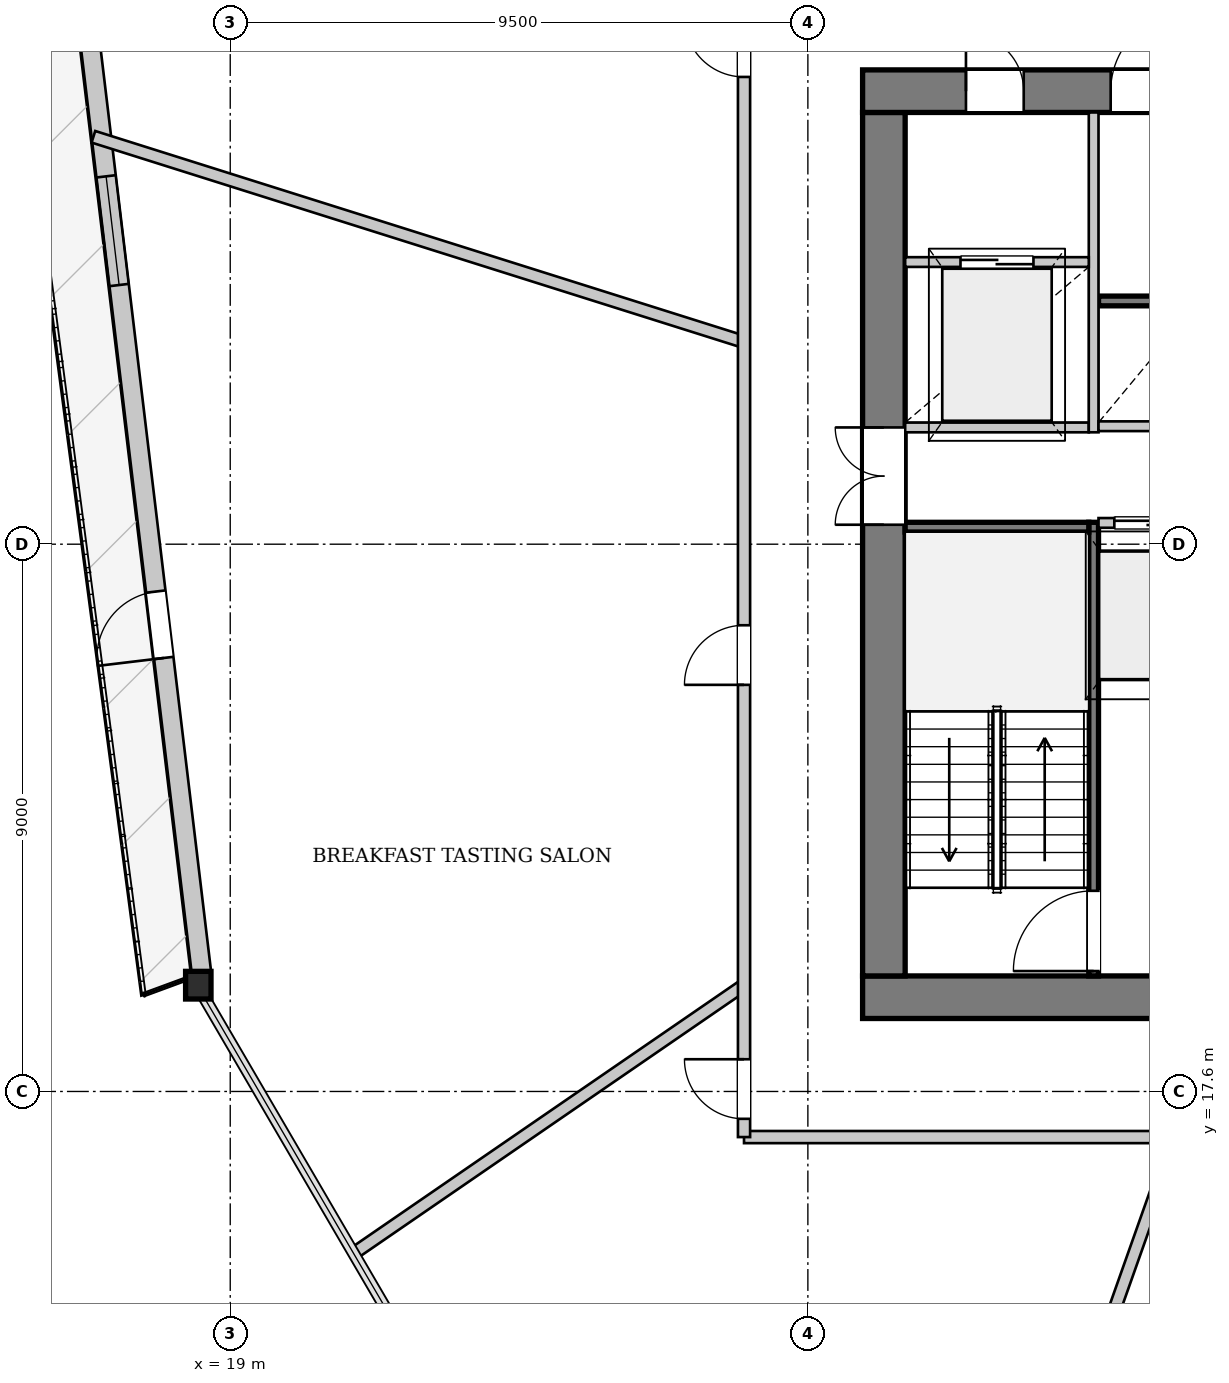
"""IFC4 building model, lengths in metres.
Left out: names, types, materials, properties, quantities, classifications, styles, units other than length and angle.
Written with IfcOpenShell. Run it as: python <this file> out.ifc"""

import sys

from ifc_helpers import new_model, si_unit, direction, frame, frame_2d, origin, origin_2d, place, context, subcontext, project, spatial, rectangle, i_section, extrude, source, transform, mapped, element, fill, save


model = new_model("IFC4")
c1 = context("Model", 3, precision=1e-05, world=origin(), true_north=direction((0.0, 1.0)))
c2 = subcontext(c1, "Body", "Model", "MODEL_VIEW")
j1 = project(units=[si_unit("LENGTHUNIT", "METRE"), si_unit("PLANEANGLEUNIT", "RADIAN")], contexts=[c1])
p1 = place(None, origin())
s1 = spatial("IfcSite", under=j1, at=p1, CompositionType="ELEMENT")
p2 = place(p1, origin())
s2 = spatial("IfcBuilding", under=s1, at=p2, CompositionType="ELEMENT")
p3 = place(p2, frame((0.0, 0.0, 116.35)))
s3 = spatial("IfcBuildingStorey", under=s2, at=p3, CompositionType="ELEMENT", Elevation=116.35)
m1 = source(origin(), c2, "Body", "SweptSolid", [
    extrude(i_section(OverallWidth=0.418, OverallDepth=0.455, WebThickness=0.038, FlangeThickness=0.059, at=origin_2d()), origin(), (0.0, 0.0, 1.0), 3.402),
])
p4 = place(p3, frame((18.374, 19.485, 0.0), z_axis=(0.059560945923, -0.080730197787, 0.994954837611), x_axis=(0.804696120474, 0.593686915549, 0.0)))
e1 = element("IfcColumn", 1, at=p4, inside=s3, PredefinedType="COLUMN", context=c2, shape_type="MappedRepresentation", body=[
    mapped(m1, transform((0.0, 0.0, 0.0), x_axis=(1.0, 0.0, 0.0), y_axis=(0.0, 1.0, 0.0), z_axis=(0.0, 0.0, 1.0), scale=1.0)),
])
p5 = place(p3, frame((52.121, 16.301, 0.0), z_axis=(0.0, 0.0, 1.0), x_axis=(-0.821520503946, -0.570178973303, 0.0)))
e2 = element("IfcWall", 2, at=p5, inside=s3, PredefinedType="SOLIDWALL", context=c2, shape_type="SweptSolid", body=[
    extrude(rectangle(XDim=23.887, YDim=0.32, at=frame_2d((11.944, 0.0))), origin(), (0.0, 0.0, 1.0), 2.692),
])
p6 = place(p5, frame((7.094, 0.0, 0.0)))
e3 = element("IfcOpeningElement", 3, at=p6, cuts=e2, PredefinedType="OPENING", context=c2, shape_type="SweptSolid", body=[
    extrude(rectangle(XDim=1.1, YDim=2.3, at=frame_2d((0.55, 1.15))), frame((0.0, 0.17, 0.0), z_axis=(0.0, -1.0, 0.0), x_axis=(1.0, 0.0, 0.0)), (0.0, 0.0, 1.0), 0.34),
])
p7 = place(p5, frame((16.777, 0.0, 0.372)))
e4 = element("IfcOpeningElement", 4, at=p7, cuts=e2, PredefinedType="OPENING", context=c2, shape_type="SweptSolid", body=[
    extrude(rectangle(XDim=1.8, YDim=2.2, at=frame_2d((0.9, 1.1))), frame((0.0, 0.17, 0.0), z_axis=(0.0, -1.0, 0.0), x_axis=(1.0, 0.0, 0.0)), (0.0, 0.0, 1.0), 0.34),
])
p8 = place(p3, frame((18.532, 19.504, 0.0), z_axis=(0.0, 0.0, 1.0), x_axis=(-0.118889186276, 0.992907529122, 0.0)))
e5 = element("IfcWall", 5, at=p8, inside=s3, PredefinedType="SOLIDWALL", context=c2, shape_type="SweptSolid", body=[
    extrude(rectangle(XDim=18.161, YDim=0.32, at=frame_2d((9.081, 0.0))), origin(), (0.0, 0.0, 1.0), 2.692),
])
p9 = place(p8, frame((5.262, 0.0, 0.0)))
e6 = element("IfcOpeningElement", 6, at=p9, cuts=e5, PredefinedType="OPENING", context=c2, shape_type="SweptSolid", body=[
    extrude(rectangle(XDim=1.1, YDim=2.3, at=frame_2d((0.55, 1.15))), frame((0.0, 0.17, 0.0), z_axis=(0.0, -1.0, 0.0), x_axis=(1.0, 0.0, 0.0)), (0.0, 0.0, 1.0), 0.34),
])
p10 = place(p8, frame((11.439, 0.0, 0.372)))
e7 = element("IfcOpeningElement", 7, at=p10, cuts=e5, PredefinedType="OPENING", context=c2, shape_type="SweptSolid", body=[
    extrude(rectangle(XDim=1.8, YDim=2.2, at=frame_2d((0.9, 1.1))), frame((0.0, 0.17, 0.0), z_axis=(0.0, -1.0, 0.0), x_axis=(1.0, 0.0, 0.0)), (0.0, 0.0, 1.0), 0.34),
])
p11 = place(p3, frame((46.6, 19.15, 0.0), z_axis=(0.0, 0.0, 1.0), x_axis=(-1.0, 0.0, 0.0)))
e8 = element("IfcWall", 8, at=p11, inside=s3, PredefinedType="SHEAR", context=c2, shape_type="SweptSolid", body=[
    extrude(rectangle(XDim=17.2, YDim=0.7, at=frame_2d((8.6, 0.0))), origin(), (0.0, 0.0, 1.0), 3.3),
])
p12 = place(p11, frame((4.8, 0.0, 0.0)))
e9 = element("IfcOpeningElement", 9, at=p12, cuts=e8, PredefinedType="OPENING", context=c2, shape_type="SweptSolid", body=[
    extrude(rectangle(XDim=1.12, YDim=2.25, at=frame_2d((0.56, 1.125))), frame((0.0, 0.36, 0.0), z_axis=(0.0, -1.0, 0.0), x_axis=(1.0, 0.0, 0.0)), (0.0, 0.0, 1.0), 0.72),
])
p13 = place(p11, frame((11.3, 0.0, 0.0)))
e10 = element("IfcOpeningElement", 10, at=p13, cuts=e8, PredefinedType="OPENING", context=c2, shape_type="SweptSolid", body=[
    extrude(rectangle(XDim=1.12, YDim=2.25, at=frame_2d((0.56, 1.125))), frame((0.0, 0.36, 0.0), z_axis=(0.0, -1.0, 0.0), x_axis=(1.0, 0.0, 0.0)), (0.0, 0.0, 1.0), 0.72),
])
p14 = place(p3, frame((29.75, 19.5, 0.0), z_axis=(0.0, 0.0, 1.0), x_axis=(0.0, 1.0, 0.0)))
e11 = element("IfcWall", 11, at=p14, inside=s3, PredefinedType="SHEAR", context=c2, shape_type="SweptSolid", body=[
    extrude(rectangle(XDim=14.2, YDim=0.7, at=frame_2d((7.1, 0.0))), origin(), (0.0, 0.0, 1.0), 3.3),
])
p15 = place(p14, frame((7.42, 0.0, 0.0)))
e12 = element("IfcOpeningElement", 12, at=p15, cuts=e11, PredefinedType="OPENING", context=c2, shape_type="SweptSolid", body=[
    extrude(rectangle(XDim=1.6, YDim=2.2, at=frame_2d((0.8, 1.1))), frame((0.0, 0.36, 0.0), z_axis=(0.0, -1.0, 0.0), x_axis=(1.0, 0.0, 0.0)), (0.0, 0.0, 1.0), 0.72),
])
p16 = place(p3, frame((29.4, 34.05, 0.0), z_axis=(0.0, 0.0, 1.0), x_axis=(1.0, 0.0, 0.0)))
e13 = element("IfcWall", 13, at=p16, inside=s3, PredefinedType="SHEAR", context=c2, shape_type="SweptSolid", body=[
    extrude(rectangle(XDim=17.2, YDim=0.7, at=frame_2d((8.6, 0.0))), origin(), (0.0, 0.0, 1.0), 3.3),
])
p17 = place(p16, frame((1.7, 0.0, 0.0)))
e14 = element("IfcOpeningElement", 14, at=p17, cuts=e13, PredefinedType="OPENING", context=c2, shape_type="SweptSolid", body=[
    extrude(rectangle(XDim=0.95, YDim=2.1, at=frame_2d((0.475, 1.05))), frame((0.0, 0.36, 0.0), z_axis=(0.0, -1.0, 0.0), x_axis=(1.0, 0.0, 0.0)), (0.0, 0.0, 1.0), 0.72),
])
p18 = place(p16, frame((4.08, 0.0, 0.0)))
e15 = element("IfcOpeningElement", 15, at=p18, cuts=e13, PredefinedType="OPENING", context=c2, shape_type="SweptSolid", body=[
    extrude(rectangle(XDim=1.32, YDim=2.2, at=frame_2d((0.66, 1.1))), frame((0.0, 0.36, 0.0), z_axis=(0.0, -1.0, 0.0), x_axis=(1.0, 0.0, 0.0)), (0.0, 0.0, 1.0), 0.72),
])
p19 = place(p16, frame((15.15, 0.0, 0.0)))
e16 = element("IfcOpeningElement", 16, at=p19, cuts=e13, PredefinedType="OPENING", context=c2, shape_type="SweptSolid", body=[
    extrude(rectangle(XDim=0.95, YDim=2.1, at=frame_2d((0.475, 1.05))), frame((0.0, 0.36, 0.0), z_axis=(0.0, -1.0, 0.0), x_axis=(1.0, 0.0, 0.0)), (0.0, 0.0, 1.0), 0.72),
])
p20 = place(p3, frame((33.2, 19.5, 0.0), z_axis=(0.0, 0.0, 1.0), x_axis=(0.0, 1.0, 0.0)))
e17 = element("IfcWall", 17, at=p20, inside=s3, PredefinedType="PARTITIONING", context=c2, shape_type="SweptSolid", body=[
    extrude(rectangle(XDim=7.46, YDim=0.16, at=frame_2d((3.73, 0.0))), origin(), (0.0, 0.0, 1.0), 3.3),
])
p21 = place(p20, frame((0.08, 0.0, 0.0)))
e18 = element("IfcOpeningElement", 18, at=p21, cuts=e17, PredefinedType="OPENING", context=c2, shape_type="SweptSolid", body=[
    extrude(rectangle(XDim=1.32, YDim=2.2, at=frame_2d((0.66, 1.1))), frame((0.0, 0.09, 0.0), z_axis=(0.0, -1.0, 0.0), x_axis=(1.0, 0.0, 0.0)), (0.0, 0.0, 1.0), 0.18),
])
p22 = place(p3, frame((30.1, 26.88, 0.0), z_axis=(0.0, 0.0, 1.0), x_axis=(1.0, 0.0, 0.0)))
e19 = element("IfcWall", 19, at=p22, inside=s3, PredefinedType="PARTITIONING", context=c2, shape_type="SweptSolid", body=[
    extrude(rectangle(XDim=3.02, YDim=0.16, at=frame_2d((1.51, 0.0))), origin(), (0.0, 0.0, 1.0), 3.3),
])
p23 = place(p3, frame((33.28, 30.6, 0.0), z_axis=(0.0, 0.0, 1.0), x_axis=(1.0, 0.0, 0.0)))
e20 = element("IfcWall", 20, at=p23, inside=s3, PredefinedType="PARTITIONING", context=c2, shape_type="SweptSolid", body=[
    extrude(rectangle(XDim=7.3, YDim=0.16, at=frame_2d((3.65, 0.0))), origin(), (0.0, 0.0, 1.0), 3.3),
])
p24 = place(p3, frame((33.28, 24.49, 0.0), z_axis=(0.0, 0.0, 1.0), x_axis=(1.0, 0.0, 0.0)))
e21 = element("IfcWall", 21, at=p24, inside=s3, PredefinedType="PARTITIONING", context=c2, shape_type="SweptSolid", body=[
    extrude(rectangle(XDim=9.44, YDim=0.16, at=frame_2d((4.72, 0.0))), origin(), (0.0, 0.0, 1.0), 3.3),
])
p25 = place(p3, frame((30.1, 28.52, 0.0), z_axis=(0.0, 0.0, 1.0), x_axis=(1.0, 0.0, 0.0)))
e22 = element("IfcWall", 22, at=p25, inside=s3, PredefinedType="PARTITIONING", context=c2, shape_type="SweptSolid", body=[
    extrude(rectangle(XDim=3.02, YDim=0.16, at=frame_2d((1.51, 0.0))), origin(), (0.0, 0.0, 1.0), 3.3),
])
p26 = place(p3, frame((33.2, 28.44, 0.0), z_axis=(0.0, 0.0, 1.0), x_axis=(0.0, 1.0, 0.0)))
e23 = element("IfcWall", 23, at=p26, inside=s3, PredefinedType="PARTITIONING", context=c2, shape_type="SweptSolid", body=[
    extrude(rectangle(XDim=5.26, YDim=0.16, at=frame_2d((2.63, 0.0))), origin(), (0.0, 0.0, 1.0), 3.3),
])
p27 = place(p3, frame((30.1, 31.24, 0.0), z_axis=(0.0, 0.0, 1.0), x_axis=(1.0, 0.0, 0.0)))
e24 = element("IfcWall", 24, at=p27, inside=s3, PredefinedType="PARTITIONING", context=c2, shape_type="SweptSolid", body=[
    extrude(rectangle(XDim=3.02, YDim=0.16, at=frame_2d((1.51, 0.0))), origin(), (0.0, 0.0, 1.0), 3.3),
])
p28 = place(p27, frame((0.91, 0.0, 0.0)))
e25 = element("IfcOpeningElement", 25, at=p28, cuts=e24, PredefinedType="OPENING", context=c2, shape_type="SweptSolid", body=[
    extrude(rectangle(XDim=1.2, YDim=2.2, at=frame_2d((0.6, 1.1))), frame((0.0, 0.09, 0.0), z_axis=(0.0, -1.0, 0.0), x_axis=(1.0, 0.0, 0.0)), (0.0, 0.0, 1.0), 0.18),
])
p29 = place(p3, frame((33.28, 26.95, 0.0), z_axis=(0.0, 0.0, 1.0), x_axis=(1.0, 0.0, 0.0)))
e26 = element("IfcWall", 26, at=p29, inside=s3, PredefinedType="PARTITIONING", context=c2, shape_type="SweptSolid", body=[
    extrude(rectangle(XDim=9.44, YDim=0.16, at=frame_2d((4.72, 0.0))), origin(), (0.0, 0.0, 1.0), 3.3),
])
p30 = place(p29, frame((0.26, 0.0, 0.0)))
e27 = element("IfcOpeningElement", 27, at=p30, cuts=e26, PredefinedType="OPENING", context=c2, shape_type="SweptSolid", body=[
    extrude(rectangle(XDim=1.1, YDim=2.2, at=frame_2d((0.55, 1.1))), frame((0.0, 0.09, 0.0), z_axis=(0.0, -1.0, 0.0), x_axis=(1.0, 0.0, 0.0)), (0.0, 0.0, 1.0), 0.18),
])
p31 = place(p29, frame((2.01, 0.0, 0.0)))
e28 = element("IfcOpeningElement", 28, at=p31, cuts=e26, PredefinedType="OPENING", context=c2, shape_type="SweptSolid", body=[
    extrude(rectangle(XDim=1.1, YDim=2.2, at=frame_2d((0.55, 1.1))), frame((0.0, 0.09, 0.0), z_axis=(0.0, -1.0, 0.0), x_axis=(1.0, 0.0, 0.0)), (0.0, 0.0, 1.0), 0.18),
])
p32 = place(p29, frame((3.76, 0.0, 0.0)))
e29 = element("IfcOpeningElement", 29, at=p32, cuts=e26, PredefinedType="OPENING", context=c2, shape_type="SweptSolid", body=[
    extrude(rectangle(XDim=1.1, YDim=2.2, at=frame_2d((0.55, 1.1))), frame((0.0, 0.09, 0.0), z_axis=(0.0, -1.0, 0.0), x_axis=(1.0, 0.0, 0.0)), (0.0, 0.0, 1.0), 0.18),
])
p33 = place(p29, frame((5.51, 0.0, 0.0)))
e30 = element("IfcOpeningElement", 30, at=p33, cuts=e26, PredefinedType="OPENING", context=c2, shape_type="SweptSolid", body=[
    extrude(rectangle(XDim=1.1, YDim=2.2, at=frame_2d((0.55, 1.1))), frame((0.0, 0.09, 0.0), z_axis=(0.0, -1.0, 0.0), x_axis=(1.0, 0.0, 0.0)), (0.0, 0.0, 1.0), 0.18),
])
p34 = place(p3, frame((33.28, 28.54, 0.0), z_axis=(0.0, 0.0, 1.0), x_axis=(1.0, 0.0, 0.0)))
e31 = element("IfcWall", 31, at=p34, inside=s3, PredefinedType="PARTITIONING", context=c2, shape_type="SweptSolid", body=[
    extrude(rectangle(XDim=12.62, YDim=0.16, at=frame_2d((6.31, 0.0))), origin(), (0.0, 0.0, 1.0), 3.3),
])
p35 = place(p3, frame((34.547, 16.85, 0.0), z_axis=(0.0, 0.0, 1.0), x_axis=(-0.333802235789, -0.942643128327, 0.0)))
e32 = element("IfcWall", 32, at=p35, inside=s3, PredefinedType="PARTITIONING", context=c2, shape_type="SweptSolid", body=[
    extrude(rectangle(XDim=14.392, YDim=0.2, at=frame_2d((7.196, 0.0))), origin(), (0.0, 0.0, 1.0), 3.3),
])
p36 = place(p3, frame((27.45, 29.927, 0.0), z_axis=(0.0, 0.0, 1.0), x_axis=(-0.953718389909, 0.300701235031, 0.0)))
e33 = element("IfcWall", 33, at=p36, inside=s3, PredefinedType="PARTITIONING", context=c2, shape_type="SweptSolid", body=[
    extrude(rectangle(XDim=11.22, YDim=0.2, at=frame_2d((5.61, 0.0))), origin(), (0.0, 0.0, 1.0), 3.3),
])
p37 = place(p3, frame((27.45, 19.349, 0.0), z_axis=(0.0, 0.0, 1.0), x_axis=(-0.824117180706, -0.566419343301, 0.0)))
e34 = element("IfcWall", 34, at=p37, inside=s3, PredefinedType="PARTITIONING", context=c2, shape_type="SweptSolid", body=[
    extrude(rectangle(XDim=7.761, YDim=0.2, at=frame_2d((3.88, 0.0))), origin(), (0.0, 0.0, 1.0), 3.3),
])
p38 = place(p3, frame((27.45, 16.85, 0.0), z_axis=(0.0, 0.0, 1.0), x_axis=(1.0, 0.0, 0.0)))
e35 = element("IfcWall", 35, at=p38, inside=s3, PredefinedType="PARTITIONING", context=c2, shape_type="SweptSolid", body=[
    extrude(rectangle(XDim=21.1, YDim=0.2, at=frame_2d((10.55, 0.0))), origin(), (0.0, 0.0, 1.0), 3.045),
])
p39 = place(p38, frame((8.224, 0.0, 0.0)))
e36 = element("IfcOpeningElement", 36, at=p39, cuts=e35, PredefinedType="OPENING", context=c2, shape_type="SweptSolid", body=[
    extrude(rectangle(XDim=0.98, YDim=2.15, at=frame_2d((0.49, 1.075))), frame((0.0, 0.11, 0.0), z_axis=(0.0, -1.0, 0.0), x_axis=(1.0, 0.0, 0.0)), (0.0, 0.0, 1.0), 0.22),
])
p40 = place(p38, frame((19.82, 0.0, 0.0)))
e37 = element("IfcOpeningElement", 37, at=p40, cuts=e35, PredefinedType="OPENING", context=c2, shape_type="SweptSolid", body=[
    extrude(rectangle(XDim=0.98, YDim=2.15, at=frame_2d((0.49, 1.075))), frame((0.0, 0.11, 0.0), z_axis=(0.0, -1.0, 0.0), x_axis=(1.0, 0.0, 0.0)), (0.0, 0.0, 1.0), 0.22),
])
p41 = place(p3, frame((27.45, 16.85, 0.0), z_axis=(0.0, 0.0, 1.0), x_axis=(0.0, 1.0, 0.0)))
e38 = element("IfcWall", 38, at=p41, inside=s3, PredefinedType="PARTITIONING", context=c2, shape_type="SweptSolid", body=[
    extrude(rectangle(XDim=19.5, YDim=0.2, at=frame_2d((9.75, 0.0))), origin(), (0.0, 0.0, 1.0), 3.3),
])
p42 = place(p41, frame((17.434, 0.0, 0.0)))
e39 = element("IfcOpeningElement", 39, at=p42, cuts=e38, PredefinedType="OPENING", context=c2, shape_type="SweptSolid", body=[
    extrude(rectangle(XDim=0.98, YDim=2.15, at=frame_2d((0.49, 1.075))), frame((0.0, 0.11, 0.0), z_axis=(0.0, -1.0, 0.0), x_axis=(1.0, 0.0, 0.0)), (0.0, 0.0, 1.0), 0.22),
])
p43 = place(p41, frame((7.437, 0.0, 0.0)))
e40 = element("IfcOpeningElement", 40, at=p43, cuts=e38, PredefinedType="OPENING", context=c2, shape_type="SweptSolid", body=[
    extrude(rectangle(XDim=0.98, YDim=2.15, at=frame_2d((0.49, 1.075))), frame((0.0, 0.11, 0.0), z_axis=(0.0, -1.0, 0.0), x_axis=(1.0, 0.0, 0.0)), (0.0, 0.0, 1.0), 0.22),
])
p44 = place(p41, frame((0.3, 0.0, 0.0)))
e41 = element("IfcOpeningElement", 41, at=p44, cuts=e38, PredefinedType="OPENING", context=c2, shape_type="SweptSolid", body=[
    extrude(rectangle(XDim=0.98, YDim=2.15, at=frame_2d((0.49, 1.075))), frame((0.0, 0.11, 0.0), z_axis=(0.0, -1.0, 0.0), x_axis=(1.0, 0.0, 0.0)), (0.0, 0.0, 1.0), 0.22),
])
m2 = source(origin(), c2, "Body", "SweptSolid", [
    extrude(rectangle(XDim=1.1, YDim=2.3, at=frame_2d((0.55, 1.15))), frame((0.0, 0.025, 0.0), z_axis=(0.0, -1.0, 0.0), x_axis=(1.0, 0.0, 0.0)), (0.0, 0.0, 1.0), 0.05),
])
p45 = place(p9, origin())
e42 = element("IfcDoor", 42, at=p45, inside=s3, OperationType="SINGLE_SWING_LEFT", PredefinedType="DOOR", context=c2, shape_type="MappedRepresentation", body=[
    mapped(m2, transform((0.0, 0.0, 0.0), x_axis=(1.0, 0.0, 0.0), y_axis=(0.0, 1.0, 0.0), z_axis=(0.0, 0.0, 1.0), scale=1.0)),
])
fill(e6, e42)
m3 = source(origin(), c2, "Body", "SweptSolid", [
    extrude(rectangle(XDim=1.8, YDim=2.2, at=frame_2d((0.9, 1.1))), frame((0.0, 0.03, 0.0), z_axis=(0.0, -1.0, 0.0), x_axis=(1.0, 0.0, 0.0)), (0.0, 0.0, 1.0), 0.06),
])
p46 = place(p10, origin())
e43 = element("IfcWindow", 43, at=p46, inside=s3, PartitioningType="SINGLE_PANEL", PredefinedType="WINDOW", context=c2, shape_type="MappedRepresentation", body=[
    mapped(m3, transform((0.0, 0.0, 0.0), x_axis=(1.0, 0.0, 0.0), y_axis=(0.0, 1.0, 0.0), z_axis=(0.0, 0.0, 1.0), scale=1.0)),
])
fill(e7, e43)
m4 = source(origin(), c2, "Body", "SweptSolid", [
    extrude(rectangle(XDim=1.6, YDim=2.2, at=frame_2d((0.8, 1.1))), frame((0.0, 0.025, 0.0), z_axis=(0.0, -1.0, 0.0), x_axis=(1.0, 0.0, 0.0)), (0.0, 0.0, 1.0), 0.05),
])
p47 = place(p15, origin())
e44 = element("IfcDoor", 44, at=p47, inside=s3, OperationType="DOUBLE_DOOR_SINGLE_SWING", PredefinedType="DOOR", context=c2, shape_type="MappedRepresentation", body=[
    mapped(m4, transform((0.0, 0.0, 0.0), x_axis=(1.0, 0.0, 0.0), y_axis=(0.0, 1.0, 0.0), z_axis=(0.0, 0.0, 1.0), scale=1.0)),
])
fill(e12, e44)
m5 = source(origin(), c2, "Body", "SweptSolid", [
    extrude(rectangle(XDim=0.95, YDim=2.1, at=frame_2d((0.475, 1.05))), frame((0.0, 0.025, 0.0), z_axis=(0.0, -1.0, 0.0), x_axis=(1.0, 0.0, 0.0)), (0.0, 0.0, 1.0), 0.05),
])
p48 = place(p17, origin())
e45 = element("IfcDoor", 45, at=p48, inside=s3, OperationType="SINGLE_SWING_LEFT", PredefinedType="DOOR", context=c2, shape_type="MappedRepresentation", body=[
    mapped(m5, transform((0.0, 0.0, 0.0), x_axis=(1.0, 0.0, 0.0), y_axis=(0.0, 1.0, 0.0), z_axis=(0.0, 0.0, 1.0), scale=1.0)),
])
fill(e14, e45)
m6 = source(origin(), c2, "Body", "SweptSolid", [
    extrude(rectangle(XDim=1.32, YDim=2.2, at=frame_2d((0.66, 1.1))), frame((0.0, 0.025, 0.0), z_axis=(0.0, -1.0, 0.0), x_axis=(1.0, 0.0, 0.0)), (0.0, 0.0, 1.0), 0.05),
])
p49 = place(p18, origin())
e46 = element("IfcDoor", 46, at=p49, inside=s3, OperationType="SINGLE_SWING_RIGHT", PredefinedType="DOOR", context=c2, shape_type="MappedRepresentation", body=[
    mapped(m6, transform((0.0, 0.0, 0.0), x_axis=(1.0, 0.0, 0.0), y_axis=(0.0, 1.0, 0.0), z_axis=(0.0, 0.0, 1.0), scale=1.0)),
])
fill(e15, e46)
p50 = place(p21, origin())
e47 = element("IfcDoor", 47, at=p50, inside=s3, OperationType="SINGLE_SWING_LEFT", PredefinedType="DOOR", context=c2, shape_type="MappedRepresentation", body=[
    mapped(m6, transform((0.0, 0.0, 0.0), x_axis=(1.0, 0.0, 0.0), y_axis=(0.0, 1.0, 0.0), z_axis=(0.0, 0.0, 1.0), scale=1.0)),
])
fill(e18, e47)
m7 = source(origin(), c2, "Body", "SweptSolid", [
    extrude(rectangle(XDim=1.2, YDim=2.2, at=frame_2d((0.6, 1.1))), frame((0.0, 0.025, 0.0), z_axis=(0.0, -1.0, 0.0), x_axis=(1.0, 0.0, 0.0)), (0.0, 0.0, 1.0), 0.05),
])
p51 = place(p28, origin())
e48 = element("IfcDoor", 48, at=p51, inside=s3, OperationType="DOUBLE_DOOR_SLIDING", PredefinedType="DOOR", context=c2, shape_type="MappedRepresentation", body=[
    mapped(m7, transform((0.0, 0.0, 0.0), x_axis=(1.0, 0.0, 0.0), y_axis=(0.0, 1.0, 0.0), z_axis=(0.0, 0.0, 1.0), scale=1.0)),
])
fill(e25, e48)
m8 = source(origin(), c2, "Body", "SweptSolid", [
    extrude(rectangle(XDim=1.1, YDim=2.2, at=frame_2d((0.55, 1.1))), frame((0.0, 0.025, 0.0), z_axis=(0.0, -1.0, 0.0), x_axis=(1.0, 0.0, 0.0)), (0.0, 0.0, 1.0), 0.05),
])
p52 = place(p30, origin())
e49 = element("IfcDoor", 49, at=p52, inside=s3, OperationType="DOUBLE_DOOR_SLIDING", PredefinedType="DOOR", context=c2, shape_type="MappedRepresentation", body=[
    mapped(m8, transform((0.0, 0.0, 0.0), x_axis=(1.0, 0.0, 0.0), y_axis=(0.0, 1.0, 0.0), z_axis=(0.0, 0.0, 1.0), scale=1.0)),
])
fill(e27, e49)
m9 = source(origin(), c2, "Body", "SweptSolid", [
    extrude(rectangle(XDim=0.98, YDim=2.15, at=frame_2d((0.49, 1.075))), frame((0.0, 0.025, 0.0), z_axis=(0.0, -1.0, 0.0), x_axis=(1.0, 0.0, 0.0)), (0.0, 0.0, 1.0), 0.05),
])
p53 = place(p42, origin())
e50 = element("IfcDoor", 50, at=p53, inside=s3, OperationType="SINGLE_SWING_RIGHT", PredefinedType="DOOR", context=c2, shape_type="MappedRepresentation", body=[
    mapped(m9, transform((0.0, 0.0, 0.0), x_axis=(1.0, 0.0, 0.0), y_axis=(0.0, 1.0, 0.0), z_axis=(0.0, 0.0, 1.0), scale=1.0)),
])
fill(e39, e50)
p54 = place(p43, origin())
e51 = element("IfcDoor", 51, at=p54, inside=s3, OperationType="SINGLE_SWING_LEFT", PredefinedType="DOOR", context=c2, shape_type="MappedRepresentation", body=[
    mapped(m9, transform((0.0, 0.0, 0.0), x_axis=(1.0, 0.0, 0.0), y_axis=(0.0, 1.0, 0.0), z_axis=(0.0, 0.0, 1.0), scale=1.0)),
])
fill(e40, e51)
p55 = place(p44, origin())
e52 = element("IfcDoor", 52, at=p55, inside=s3, OperationType="SINGLE_SWING_RIGHT", PredefinedType="DOOR", context=c2, shape_type="MappedRepresentation", body=[
    mapped(m9, transform((0.0, 0.0, 0.0), x_axis=(1.0, 0.0, 0.0), y_axis=(0.0, 1.0, 0.0), z_axis=(0.0, 0.0, 1.0), scale=1.0)),
])
fill(e41, e52)
save(model, sys.argv[1])
